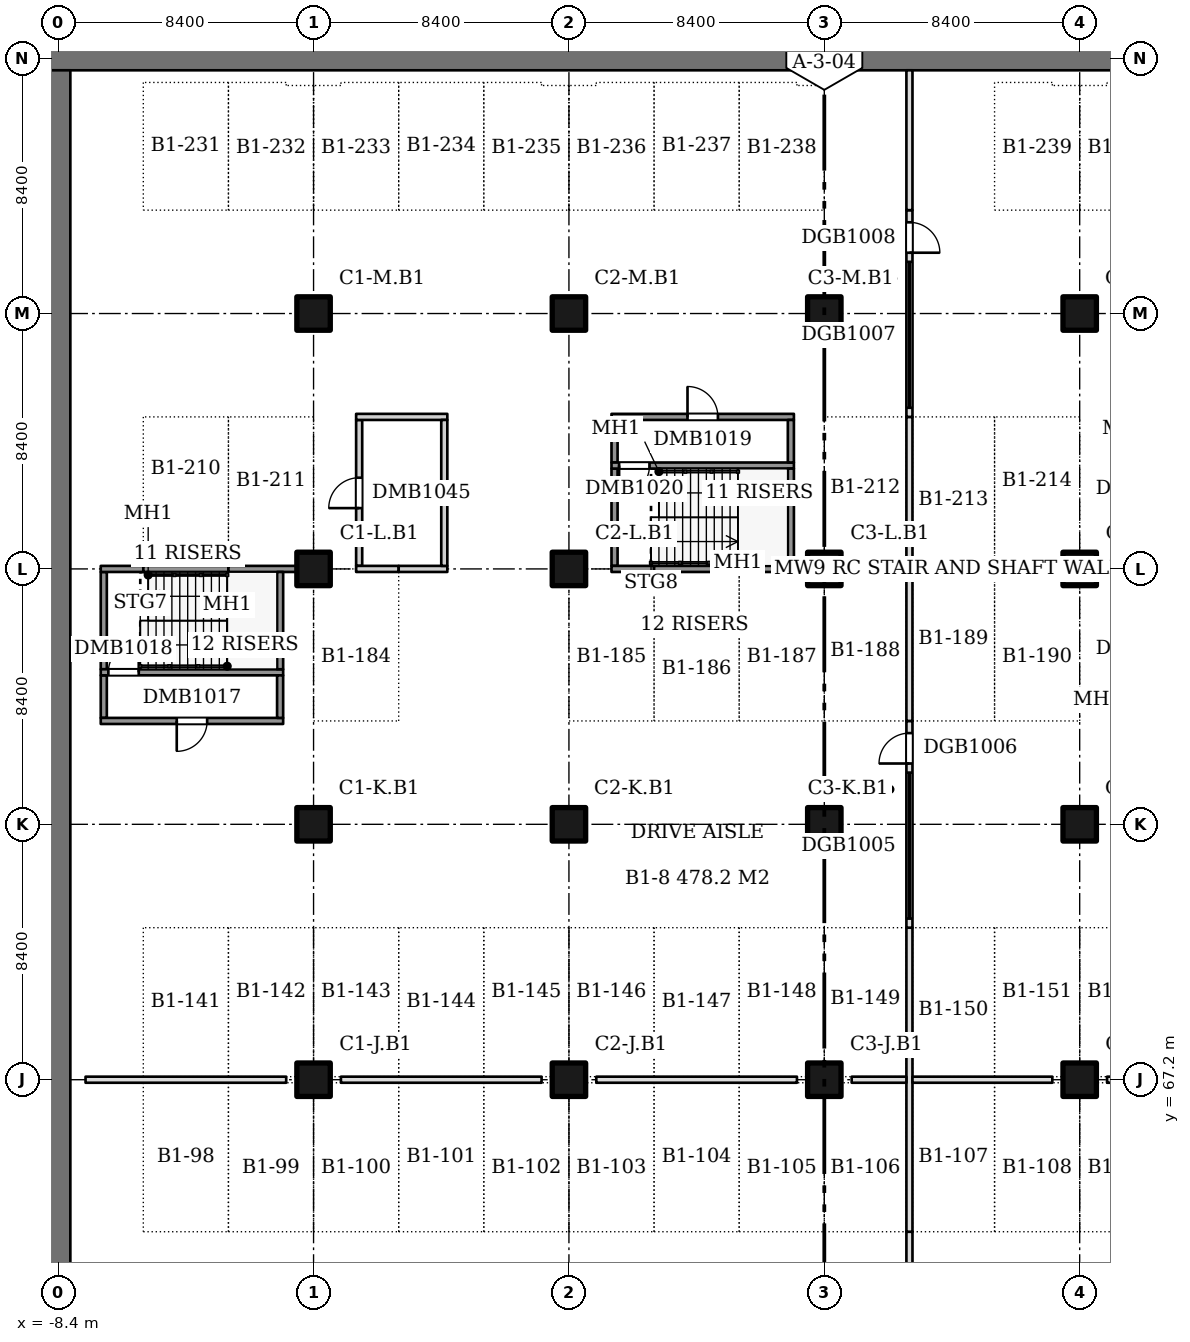
"""IFC4 building model, lengths in metres.
Left out: names, types, materials, properties, quantities, classifications, styles, units other than length and angle.
Written with IfcOpenShell. Run it as: python <this file> out.ifc"""

import sys

from ifc_helpers import new_model, si_unit, direction, frame, frame_2d, origin, origin_2d, place, context, subcontext, project, spatial, rectangle, extrude, element, fill, save


model = new_model("IFC4")
c1 = context("Model", 3, precision=1e-05, world=origin(), true_north=direction((0.0, 1.0)))
c2 = subcontext(c1, "Body", "Model", "MODEL_VIEW")
j1 = project(units=[si_unit("LENGTHUNIT", "METRE"), si_unit("PLANEANGLEUNIT", "RADIAN")], contexts=[c1])
p1 = place(None, origin())
s1 = spatial("IfcSite", under=j1, at=p1, CompositionType="ELEMENT")
p2 = place(p1, origin())
s2 = spatial("IfcBuilding", under=s1, at=p2, CompositionType="ELEMENT")
p3 = place(p2, frame((0.0, 0.0, -4.0)))
s3 = spatial("IfcBuildingStorey", under=s2, at=p3, CompositionType="ELEMENT", Elevation=-4.0)
p4 = place(p3, frame((-8.8, 100.8, 0.0), z_axis=(0.0, 0.0, 1.0), x_axis=(1.0, 0.0, 0.0)))
e1 = element("IfcWall", 1, at=p4, inside=s3, PredefinedType="SOLIDWALL", context=c2, shape_type="SweptSolid", body=[
    extrude(rectangle(XDim=135.2, YDim=0.8, at=frame_2d((67.6, 0.0))), origin(), (0.0, 0.0, 1.0), 3.6),
])
p5 = place(p3, frame((-8.4, 0.4, 0.0), z_axis=(0.0, 0.0, 1.0), x_axis=(0.0, 1.0, 0.0)))
e2 = element("IfcWall", 2, at=p5, inside=s3, PredefinedType="SOLIDWALL", context=c2, shape_type="SweptSolid", body=[
    extrude(rectangle(XDim=100.0, YDim=0.8, at=frame_2d((50.0, 0.0))), origin(), (0.0, 0.0, 1.0), 3.6),
])
for number, where, z_axis, x_axis in (
    (3, (0.0, 67.2, 0.0), (0.0, 0.0, 1.0), (1.0, 0.0, 0.0)),
    (4, (0.0, 75.6, 0.0), (0.0, 0.0, 1.0), (1.0, 0.0, 0.0)),
    (5, (0.0, 84.0, 0.0), (0.0, 0.0, 1.0), (1.0, 0.0, 0.0)),
    (6, (0.0, 92.4, 0.0), (0.0, 0.0, 1.0), (1.0, 0.0, 0.0)),
    (7, (8.4, 67.2, 0.0), (0.0, 0.0, 1.0), (1.0, 0.0, 0.0)),
    (8, (8.4, 75.6, 0.0), (0.0, 0.0, 1.0), (1.0, 0.0, 0.0)),
    (9, (8.4, 84.0, 0.0), (0.0, 0.0, 1.0), (1.0, 0.0, 0.0)),
    (10, (8.4, 92.4, 0.0), (0.0, 0.0, 1.0), (1.0, 0.0, 0.0)),
    (11, (16.8, 67.2, 0.0), (0.0, 0.0, 1.0), (1.0, 0.0, 0.0)),
    (12, (16.8, 75.6, 0.0), (0.0, 0.0, 1.0), (1.0, 0.0, 0.0)),
    (13, (16.8, 84.0, 0.0), (0.0, 0.0, 1.0), (1.0, 0.0, 0.0)),
    (14, (16.8, 92.4, 0.0), (0.0, 0.0, 1.0), (1.0, 0.0, 0.0)),
    (15, (25.2, 67.2, 0.0), (0.0, 0.0, 1.0), (1.0, 0.0, 0.0)),
    (16, (25.2, 75.6, 0.0), (0.0, 0.0, 1.0), (1.0, 0.0, 0.0)),
    (17, (25.2, 84.0, 0.0), (0.0, 0.0, 1.0), (1.0, 0.0, 0.0)),
    (18, (25.2, 92.4, 0.0), (0.0, 0.0, 1.0), (1.0, 0.0, 0.0)),
):
    element("IfcColumn", number, at=place(p3, frame(where, z_axis=z_axis, x_axis=x_axis)), inside=s3, PredefinedType="COLUMN", context=c2, shape_type="SweptSolid", body=[
        extrude(rectangle(XDim=1.1, YDim=1.1, at=origin_2d()), origin(), (0.0, 0.0, 1.0), 3.6),
    ])
p6 = place(p3, frame((-6.9, 79.1, 0.0), z_axis=(0.0, 0.0, 1.0), x_axis=(0.0, 1.0, 0.0)))
e19 = element("IfcWall", 19, at=p6, inside=s3, PredefinedType="SOLIDWALL", context=c2, shape_type="SweptSolid", body=[
    extrude(rectangle(XDim=1.4, YDim=0.2, at=frame_2d((0.7, 0.0))), origin(), (0.0, 0.0, 1.0), 4.0),
])
p7 = place(p3, frame((-7.0, 79.0, 0.0), z_axis=(0.0, 0.0, 1.0), x_axis=(1.0, 0.0, 0.0)))
e20 = element("IfcWall", 20, at=p7, inside=s3, PredefinedType="SOLIDWALL", context=c2, shape_type="SweptSolid", body=[
    extrude(rectangle(XDim=6.0, YDim=0.2, at=frame_2d((3.0, 0.0))), origin(), (0.0, 0.0, 1.0), 4.0),
])
p8 = place(p7, frame((2.5, 0.0, 0.0)))
e21 = element("IfcOpeningElement", 21, at=p8, cuts=e20, PredefinedType="OPENING", context=c2, shape_type="SweptSolid", body=[
    extrude(rectangle(XDim=1.0, YDim=2.1, at=frame_2d((0.5, 1.05))), frame((0.0, 0.11, 0.0), z_axis=(0.0, -1.0, 0.0), x_axis=(1.0, 0.0, 0.0)), (0.0, 0.0, 1.0), 0.22),
])
p9 = place(p3, frame((-6.9, 80.7, 0.0), z_axis=(0.0, 0.0, 1.0), x_axis=(0.0, 1.0, 0.0)))
e22 = element("IfcWall", 22, at=p9, inside=s3, PredefinedType="SOLIDWALL", context=c2, shape_type="SweptSolid", body=[
    extrude(rectangle(XDim=3.2, YDim=0.2, at=frame_2d((1.6, 0.0))), origin(), (0.0, 0.0, 1.0), 4.0),
])
p10 = place(p3, frame((-7.0, 80.6, 0.0), z_axis=(0.0, 0.0, 1.0), x_axis=(1.0, 0.0, 0.0)))
e23 = element("IfcWall", 23, at=p10, inside=s3, PredefinedType="SOLIDWALL", context=c2, shape_type="SweptSolid", body=[
    extrude(rectangle(XDim=6.0, YDim=0.2, at=frame_2d((3.0, 0.0))), origin(), (0.0, 0.0, 1.0), 4.0),
])
p11 = place(p10, frame((0.25, 0.0, 0.0)))
e24 = element("IfcOpeningElement", 24, at=p11, cuts=e23, PredefinedType="OPENING", context=c2, shape_type="SweptSolid", body=[
    extrude(rectangle(XDim=1.0, YDim=2.1, at=frame_2d((0.5, 1.05))), frame((0.0, 0.11, 0.0), z_axis=(0.0, -1.0, 0.0), x_axis=(1.0, 0.0, 0.0)), (0.0, 0.0, 1.0), 0.22),
])
p12 = place(p3, frame((-7.0, 84.0, 0.0), z_axis=(0.0, 0.0, 1.0), x_axis=(1.0, 0.0, 0.0)))
e25 = element("IfcWall", 25, at=p12, inside=s3, PredefinedType="SOLIDWALL", context=c2, shape_type="SweptSolid", body=[
    extrude(rectangle(XDim=1.4, YDim=0.2, at=frame_2d((0.7, 0.0))), origin(), (0.0, 0.0, 1.0), 4.0),
])
p13 = place(p3, frame((-5.6, 84.0, 0.0), z_axis=(0.0, 0.0, 1.0), x_axis=(1.0, 0.0, 0.0)))
e26 = element("IfcWall", 26, at=p13, inside=s3, PredefinedType="SOLIDWALL", context=c2, shape_type="SweptSolid", body=[
    extrude(rectangle(XDim=2.8, YDim=0.2, at=frame_2d((1.4, 0.0))), origin(), (0.0, 0.0, 1.0), 4.0),
])
p14 = place(p3, frame((-2.8, 84.0, 0.0), z_axis=(0.0, 0.0, 1.0), x_axis=(1.0, 0.0, 0.0)))
e27 = element("IfcWall", 27, at=p14, inside=s3, PredefinedType="SOLIDWALL", context=c2, shape_type="SweptSolid", body=[
    extrude(rectangle(XDim=2.25, YDim=0.2, at=frame_2d((1.125, 0.0))), origin(), (0.0, 0.0, 1.0), 4.0),
])
p15 = place(p3, frame((-1.1, 79.1, 0.0), z_axis=(0.0, 0.0, 1.0), x_axis=(0.0, 1.0, 0.0)))
e28 = element("IfcWall", 28, at=p15, inside=s3, PredefinedType="SOLIDWALL", context=c2, shape_type="SweptSolid", body=[
    extrude(rectangle(XDim=1.4, YDim=0.2, at=frame_2d((0.7, 0.0))), origin(), (0.0, 0.0, 1.0), 4.0),
])
p16 = place(p3, frame((-1.1, 80.7, 0.0), z_axis=(0.0, 0.0, 1.0), x_axis=(0.0, 1.0, 0.0)))
e29 = element("IfcWall", 29, at=p16, inside=s3, PredefinedType="SOLIDWALL", context=c2, shape_type="SweptSolid", body=[
    extrude(rectangle(XDim=3.2, YDim=0.2, at=frame_2d((1.6, 0.0))), origin(), (0.0, 0.0, 1.0), 4.0),
])
p17 = place(p3, frame((1.5, 84.1, 0.0), z_axis=(0.0, 0.0, 1.0), x_axis=(0.0, 1.0, 0.0)))
e30 = element("IfcWall", 30, at=p17, inside=s3, PredefinedType="PARTITIONING", context=c2, shape_type="SweptSolid", body=[
    extrude(rectangle(XDim=4.8, YDim=0.2, at=frame_2d((2.4, 0.0))), origin(), (0.0, 0.0, 1.0), 3.6),
])
p18 = place(p17, frame((1.9, 0.0, 0.0)))
e31 = element("IfcOpeningElement", 31, at=p18, cuts=e30, PredefinedType="OPENING", context=c2, shape_type="SweptSolid", body=[
    extrude(rectangle(XDim=1.0, YDim=2.1, at=frame_2d((0.5, 1.05))), frame((0.0, 0.11, 0.0), z_axis=(0.0, -1.0, 0.0), x_axis=(1.0, 0.0, 0.0)), (0.0, 0.0, 1.0), 0.22),
])
p19 = place(p3, frame((1.4, 84.0, 0.0), z_axis=(0.0, 0.0, 1.0), x_axis=(1.0, 0.0, 0.0)))
e32 = element("IfcWall", 32, at=p19, inside=s3, PredefinedType="PARTITIONING", context=c2, shape_type="SweptSolid", body=[
    extrude(rectangle(XDim=1.4, YDim=0.2, at=frame_2d((0.7, 0.0))), origin(), (0.0, 0.0, 1.0), 3.6),
])
p20 = place(p3, frame((1.4, 89.0, 0.0), z_axis=(0.0, 0.0, 1.0), x_axis=(1.0, 0.0, 0.0)))
e33 = element("IfcWall", 33, at=p20, inside=s3, PredefinedType="PARTITIONING", context=c2, shape_type="SweptSolid", body=[
    extrude(rectangle(XDim=3.0, YDim=0.2, at=frame_2d((1.5, 0.0))), origin(), (0.0, 0.0, 1.0), 3.6),
])
p21 = place(p3, frame((2.8, 84.0, 0.0), z_axis=(0.0, 0.0, 1.0), x_axis=(1.0, 0.0, 0.0)))
e34 = element("IfcWall", 34, at=p21, inside=s3, PredefinedType="PARTITIONING", context=c2, shape_type="SweptSolid", body=[
    extrude(rectangle(XDim=1.6, YDim=0.2, at=frame_2d((0.8, 0.0))), origin(), (0.0, 0.0, 1.0), 3.6),
])
p22 = place(p3, frame((4.3, 84.1, 0.0), z_axis=(0.0, 0.0, 1.0), x_axis=(0.0, 1.0, 0.0)))
e35 = element("IfcWall", 35, at=p22, inside=s3, PredefinedType="PARTITIONING", context=c2, shape_type="SweptSolid", body=[
    extrude(rectangle(XDim=4.8, YDim=0.2, at=frame_2d((2.4, 0.0))), origin(), (0.0, 0.0, 1.0), 3.6),
])
p23 = place(p3, frame((9.9, 84.1, 0.0), z_axis=(0.0, 0.0, 1.0), x_axis=(0.0, 1.0, 0.0)))
e36 = element("IfcWall", 36, at=p23, inside=s3, PredefinedType="SOLIDWALL", context=c2, shape_type="SweptSolid", body=[
    extrude(rectangle(XDim=3.2, YDim=0.2, at=frame_2d((1.6, 0.0))), origin(), (0.0, 0.0, 1.0), 4.0),
])
for number, where, z_axis, x_axis in (
    (37, (9.8, 84.0, 0.0), (0.0, 0.0, 1.0), (1.0, 0.0, 0.0)),
    (38, (9.9, 87.5, 0.0), (0.0, 0.0, 1.0), (0.0, 1.0, 0.0)),
):
    element("IfcWall", number, at=place(p3, frame(where, z_axis=z_axis, x_axis=x_axis)), inside=s3, PredefinedType="SOLIDWALL", context=c2, shape_type="SweptSolid", body=[
        extrude(rectangle(XDim=1.4, YDim=0.2, at=frame_2d((0.7, 0.0))), origin(), (0.0, 0.0, 1.0), 4.0),
    ])
p24 = place(p3, frame((9.8, 87.4, 0.0), z_axis=(0.0, 0.0, 1.0), x_axis=(1.0, 0.0, 0.0)))
e39 = element("IfcWall", 39, at=p24, inside=s3, PredefinedType="SOLIDWALL", context=c2, shape_type="SweptSolid", body=[
    extrude(rectangle(XDim=6.0, YDim=0.2, at=frame_2d((3.0, 0.0))), origin(), (0.0, 0.0, 1.0), 4.0),
])
p25 = place(p24, frame((0.25, 0.0, 0.0)))
e40 = element("IfcOpeningElement", 40, at=p25, cuts=e39, PredefinedType="OPENING", context=c2, shape_type="SweptSolid", body=[
    extrude(rectangle(XDim=1.0, YDim=2.1, at=frame_2d((0.5, 1.05))), frame((0.0, 0.11, 0.0), z_axis=(0.0, -1.0, 0.0), x_axis=(1.0, 0.0, 0.0)), (0.0, 0.0, 1.0), 0.22),
])
p26 = place(p3, frame((9.8, 89.0, 0.0), z_axis=(0.0, 0.0, 1.0), x_axis=(1.0, 0.0, 0.0)))
e41 = element("IfcWall", 41, at=p26, inside=s3, PredefinedType="SOLIDWALL", context=c2, shape_type="SweptSolid", body=[
    extrude(rectangle(XDim=6.0, YDim=0.2, at=frame_2d((3.0, 0.0))), origin(), (0.0, 0.0, 1.0), 4.0),
])
p27 = place(p26, frame((2.5, 0.0, 0.0)))
e42 = element("IfcOpeningElement", 42, at=p27, cuts=e41, PredefinedType="OPENING", context=c2, shape_type="SweptSolid", body=[
    extrude(rectangle(XDim=1.0, YDim=2.1, at=frame_2d((0.5, 1.05))), frame((0.0, 0.11, 0.0), z_axis=(0.0, -1.0, 0.0), x_axis=(1.0, 0.0, 0.0)), (0.0, 0.0, 1.0), 0.22),
])
p28 = place(p3, frame((11.2, 84.0, 0.0), z_axis=(0.0, 0.0, 1.0), x_axis=(1.0, 0.0, 0.0)))
e43 = element("IfcWall", 43, at=p28, inside=s3, PredefinedType="SOLIDWALL", context=c2, shape_type="SweptSolid", body=[
    extrude(rectangle(XDim=2.8, YDim=0.2, at=frame_2d((1.4, 0.0))), origin(), (0.0, 0.0, 1.0), 4.0),
])
p29 = place(p3, frame((14.0, 84.0, 0.0), z_axis=(0.0, 0.0, 1.0), x_axis=(1.0, 0.0, 0.0)))
e44 = element("IfcWall", 44, at=p29, inside=s3, PredefinedType="SOLIDWALL", context=c2, shape_type="SweptSolid", body=[
    extrude(rectangle(XDim=2.25, YDim=0.2, at=frame_2d((1.125, 0.0))), origin(), (0.0, 0.0, 1.0), 4.0),
])
p30 = place(p3, frame((15.7, 84.1, 0.0), z_axis=(0.0, 0.0, 1.0), x_axis=(0.0, 1.0, 0.0)))
e45 = element("IfcWall", 45, at=p30, inside=s3, PredefinedType="SOLIDWALL", context=c2, shape_type="SweptSolid", body=[
    extrude(rectangle(XDim=3.2, YDim=0.2, at=frame_2d((1.6, 0.0))), origin(), (0.0, 0.0, 1.0), 4.0),
])
p31 = place(p3, frame((15.7, 87.5, 0.0), z_axis=(0.0, 0.0, 1.0), x_axis=(0.0, 1.0, 0.0)))
e46 = element("IfcWall", 46, at=p31, inside=s3, PredefinedType="SOLIDWALL", context=c2, shape_type="SweptSolid", body=[
    extrude(rectangle(XDim=1.4, YDim=0.2, at=frame_2d((0.7, 0.0))), origin(), (0.0, 0.0, 1.0), 4.0),
])
p32 = place(p3, frame((19.6, 58.8, 0.0), z_axis=(0.0, 0.0, 1.0), x_axis=(0.0, 1.0, 0.0)))
e47 = element("IfcWall", 47, at=p32, inside=s3, PredefinedType="PARTITIONING", context=c2, shape_type="SweptSolid", body=[
    extrude(rectangle(XDim=3.4, YDim=0.2, at=frame_2d((1.7, 0.0))), origin(), (0.0, 0.0, 1.0), 3.6),
])
p33 = place(p3, frame((19.6, 62.2, 0.0), z_axis=(0.0, 0.0, 1.0), x_axis=(0.0, 1.0, 0.0)))
e48 = element("IfcWall", 48, at=p33, inside=s3, PredefinedType="PARTITIONING", context=c2, shape_type="SweptSolid", body=[
    extrude(rectangle(XDim=10.0, YDim=0.2, at=frame_2d((5.0, 0.0))), origin(), (0.0, 0.0, 1.0), 3.6),
])
p34 = place(p3, frame((19.6, 72.2, 0.0), z_axis=(0.0, 0.0, 1.0), x_axis=(0.0, 1.0, 0.0)))
e49 = element("IfcWall", 49, at=p34, inside=s3, PredefinedType="PARTITIONING", context=c2, shape_type="SweptSolid", body=[
    extrude(rectangle(XDim=6.8, YDim=0.2, at=frame_2d((3.4, 0.0))), origin(), (0.0, 0.0, 1.0), 3.6),
])
p35 = place(p34, frame((0.3, 0.0, 0.0)))
e50 = element("IfcOpeningElement", 50, at=p35, cuts=e49, PredefinedType="OPENING", context=c2, shape_type="SweptSolid", body=[
    extrude(rectangle(XDim=4.8, YDim=2.4, at=frame_2d((2.4, 1.2))), frame((0.0, 0.11, 0.0), z_axis=(0.0, -1.0, 0.0), x_axis=(1.0, 0.0, 0.0)), (0.0, 0.0, 1.0), 0.22),
])
p36 = place(p34, frame((5.4, 0.0, 0.0)))
e51 = element("IfcOpeningElement", 51, at=p36, cuts=e49, PredefinedType="OPENING", context=c2, shape_type="SweptSolid", body=[
    extrude(rectangle(XDim=1.0, YDim=2.1, at=frame_2d((0.5, 1.05))), frame((0.0, 0.11, 0.0), z_axis=(0.0, -1.0, 0.0), x_axis=(1.0, 0.0, 0.0)), (0.0, 0.0, 1.0), 0.22),
])
p37 = place(p3, frame((19.6, 79.0, 0.0), z_axis=(0.0, 0.0, 1.0), x_axis=(0.0, 1.0, 0.0)))
e52 = element("IfcWall", 52, at=p37, inside=s3, PredefinedType="PARTITIONING", context=c2, shape_type="SweptSolid", body=[
    extrude(rectangle(XDim=10.0, YDim=0.2, at=frame_2d((5.0, 0.0))), origin(), (0.0, 0.0, 1.0), 3.6),
])
p38 = place(p3, frame((19.6, 89.0, 0.0), z_axis=(0.0, 0.0, 1.0), x_axis=(0.0, 1.0, 0.0)))
e53 = element("IfcWall", 53, at=p38, inside=s3, PredefinedType="PARTITIONING", context=c2, shape_type="SweptSolid", body=[
    extrude(rectangle(XDim=6.8, YDim=0.2, at=frame_2d((3.4, 0.0))), origin(), (0.0, 0.0, 1.0), 3.6),
])
p39 = place(p38, frame((0.3, 0.0, 0.0)))
e54 = element("IfcOpeningElement", 54, at=p39, cuts=e53, PredefinedType="OPENING", context=c2, shape_type="SweptSolid", body=[
    extrude(rectangle(XDim=4.8, YDim=2.4, at=frame_2d((2.4, 1.2))), frame((0.0, 0.11, 0.0), z_axis=(0.0, -1.0, 0.0), x_axis=(1.0, 0.0, 0.0)), (0.0, 0.0, 1.0), 0.22),
])
p40 = place(p38, frame((5.4, 0.0, 0.0)))
e55 = element("IfcOpeningElement", 55, at=p40, cuts=e53, PredefinedType="OPENING", context=c2, shape_type="SweptSolid", body=[
    extrude(rectangle(XDim=1.0, YDim=2.1, at=frame_2d((0.5, 1.05))), frame((0.0, 0.11, 0.0), z_axis=(0.0, -1.0, 0.0), x_axis=(1.0, 0.0, 0.0)), (0.0, 0.0, 1.0), 0.22),
])
p41 = place(p3, frame((19.6, 95.8, 0.0), z_axis=(0.0, 0.0, 1.0), x_axis=(0.0, 1.0, 0.0)))
e56 = element("IfcWall", 56, at=p41, inside=s3, PredefinedType="PARTITIONING", context=c2, shape_type="SweptSolid", body=[
    extrude(rectangle(XDim=4.6, YDim=0.2, at=frame_2d((2.3, 0.0))), origin(), (0.0, 0.0, 1.0), 3.6),
])
for number, where, z_axis, x_axis in (
    (57, (-7.5, 67.2, 0.0), (0.0, 0.0, 1.0), (1.0, 0.0, 0.0)),
    (58, (0.9, 67.2, 0.0), (0.0, 0.0, 1.0), (1.0, 0.0, 0.0)),
):
    element("IfcWall", number, at=place(p3, frame(where, z_axis=z_axis, x_axis=x_axis)), inside=s3, PredefinedType="PARTITIONING", context=c2, shape_type="SweptSolid", body=[
        extrude(rectangle(XDim=6.6, YDim=0.2, at=frame_2d((3.3, 0.0))), origin(), (0.0, 0.0, 1.0), 3.6),
    ])
p42 = place(p3, frame((9.3, 67.2, 0.0), z_axis=(0.0, 0.0, 1.0), x_axis=(1.0, 0.0, 0.0)))
e59 = element("IfcWall", 59, at=p42, inside=s3, PredefinedType="PARTITIONING", context=c2, shape_type="SweptSolid", body=[
    extrude(rectangle(XDim=6.6, YDim=0.2, at=frame_2d((3.3, 0.0))), origin(), (0.0, 0.0, 1.0), 3.6),
])
p43 = place(p3, frame((17.7, 67.2, 0.0), z_axis=(0.0, 0.0, 1.0), x_axis=(1.0, 0.0, 0.0)))
e60 = element("IfcWall", 60, at=p43, inside=s3, PredefinedType="PARTITIONING", context=c2, shape_type="SweptSolid", body=[
    extrude(rectangle(XDim=1.8, YDim=0.2, at=frame_2d((0.9, 0.0))), origin(), (0.0, 0.0, 1.0), 3.6),
])
p44 = place(p3, frame((19.7, 67.2, 0.0), z_axis=(0.0, 0.0, 1.0), x_axis=(1.0, 0.0, 0.0)))
e61 = element("IfcWall", 61, at=p44, inside=s3, PredefinedType="PARTITIONING", context=c2, shape_type="SweptSolid", body=[
    extrude(rectangle(XDim=4.6, YDim=0.2, at=frame_2d((2.3, 0.0))), origin(), (0.0, 0.0, 1.0), 3.6),
])
p45 = place(p3, frame((26.1, 67.2, 0.0), z_axis=(0.0, 0.0, 1.0), x_axis=(1.0, 0.0, 0.0)))
e62 = element("IfcWall", 62, at=p45, inside=s3, PredefinedType="PARTITIONING", context=c2, shape_type="SweptSolid", body=[
    extrude(rectangle(XDim=6.6, YDim=0.2, at=frame_2d((3.3, 0.0))), origin(), (0.0, 0.0, 1.0), 3.6),
])
p46 = place(p8, frame((1.0, 0.0, 0.0), z_axis=(0.0, 0.0, 1.0), x_axis=(-1.0, 0.0, 0.0)))
e63 = element("IfcDoor", 63, at=p46, inside=s3, OperationType="SINGLE_SWING_RIGHT", PredefinedType="DOOR", context=c2, shape_type="SweptSolid", body=[
    extrude(rectangle(XDim=1.0, YDim=2.1, at=frame_2d((0.5, 1.05))), frame((0.0, 0.025, 0.0), z_axis=(0.0, -1.0, 0.0), x_axis=(1.0, 0.0, 0.0)), (0.0, 0.0, 1.0), 0.05),
])
fill(e21, e63)
p47 = place(p11, origin())
e64 = element("IfcDoor", 64, at=p47, inside=s3, OperationType="SINGLE_SWING_RIGHT", PredefinedType="DOOR", context=c2, shape_type="SweptSolid", body=[
    extrude(rectangle(XDim=1.0, YDim=2.1, at=frame_2d((0.5, 1.05))), frame((0.0, 0.025, 0.0), z_axis=(0.0, -1.0, 0.0), x_axis=(1.0, 0.0, 0.0)), (0.0, 0.0, 1.0), 0.05),
])
fill(e24, e64)
p48 = place(p27, origin())
e65 = element("IfcDoor", 65, at=p48, inside=s3, OperationType="SINGLE_SWING_LEFT", PredefinedType="DOOR", context=c2, shape_type="SweptSolid", body=[
    extrude(rectangle(XDim=1.0, YDim=2.1, at=frame_2d((0.5, 1.05))), frame((0.0, 0.025, 0.0), z_axis=(0.0, -1.0, 0.0), x_axis=(1.0, 0.0, 0.0)), (0.0, 0.0, 1.0), 0.05),
])
fill(e42, e65)
p49 = place(p25, frame((1.0, 0.0, 0.0), z_axis=(0.0, 0.0, 1.0), x_axis=(-1.0, 0.0, 0.0)))
e66 = element("IfcDoor", 66, at=p49, inside=s3, OperationType="SINGLE_SWING_RIGHT", PredefinedType="DOOR", context=c2, shape_type="SweptSolid", body=[
    extrude(rectangle(XDim=1.0, YDim=2.1, at=frame_2d((0.5, 1.05))), frame((0.0, 0.025, 0.0), z_axis=(0.0, -1.0, 0.0), x_axis=(1.0, 0.0, 0.0)), (0.0, 0.0, 1.0), 0.05),
])
fill(e40, e66)
p50 = place(p18, origin())
e67 = element("IfcDoor", 67, at=p50, inside=s3, OperationType="SINGLE_SWING_LEFT", PredefinedType="DOOR", context=c2, shape_type="SweptSolid", body=[
    extrude(rectangle(XDim=1.0, YDim=2.1, at=frame_2d((0.5, 1.05))), frame((0.0, 0.025, 0.0), z_axis=(0.0, -1.0, 0.0), x_axis=(1.0, 0.0, 0.0)), (0.0, 0.0, 1.0), 0.05),
])
fill(e31, e67)
p51 = place(p35, origin())
e68 = element("IfcDoor", 68, at=p51, inside=s3, OperationType="ROLLINGUP", PredefinedType="GATE", context=c2, shape_type="SweptSolid", body=[
    extrude(rectangle(XDim=4.8, YDim=2.4, at=frame_2d((2.4, 1.2))), frame((0.0, 0.025, 0.0), z_axis=(0.0, -1.0, 0.0), x_axis=(1.0, 0.0, 0.0)), (0.0, 0.0, 1.0), 0.05),
])
fill(e50, e68)
p52 = place(p36, origin())
e69 = element("IfcDoor", 69, at=p52, inside=s3, OperationType="SINGLE_SWING_LEFT", PredefinedType="DOOR", context=c2, shape_type="SweptSolid", body=[
    extrude(rectangle(XDim=1.0, YDim=2.1, at=frame_2d((0.5, 1.05))), frame((0.0, 0.025, 0.0), z_axis=(0.0, -1.0, 0.0), x_axis=(1.0, 0.0, 0.0)), (0.0, 0.0, 1.0), 0.05),
])
fill(e51, e69)
p53 = place(p39, origin())
e70 = element("IfcDoor", 70, at=p53, inside=s3, OperationType="ROLLINGUP", PredefinedType="GATE", context=c2, shape_type="SweptSolid", body=[
    extrude(rectangle(XDim=4.8, YDim=2.4, at=frame_2d((2.4, 1.2))), frame((0.0, 0.025, 0.0), z_axis=(0.0, -1.0, 0.0), x_axis=(1.0, 0.0, 0.0)), (0.0, 0.0, 1.0), 0.05),
])
fill(e54, e70)
p54 = place(p40, frame((1.0, 0.0, 0.0), z_axis=(0.0, 0.0, 1.0), x_axis=(-1.0, 0.0, 0.0)))
e71 = element("IfcDoor", 71, at=p54, inside=s3, OperationType="SINGLE_SWING_RIGHT", PredefinedType="DOOR", context=c2, shape_type="SweptSolid", body=[
    extrude(rectangle(XDim=1.0, YDim=2.1, at=frame_2d((0.5, 1.05))), frame((0.0, 0.025, 0.0), z_axis=(0.0, -1.0, 0.0), x_axis=(1.0, 0.0, 0.0)), (0.0, 0.0, 1.0), 0.05),
])
fill(e55, e71)
save(model, sys.argv[1])
